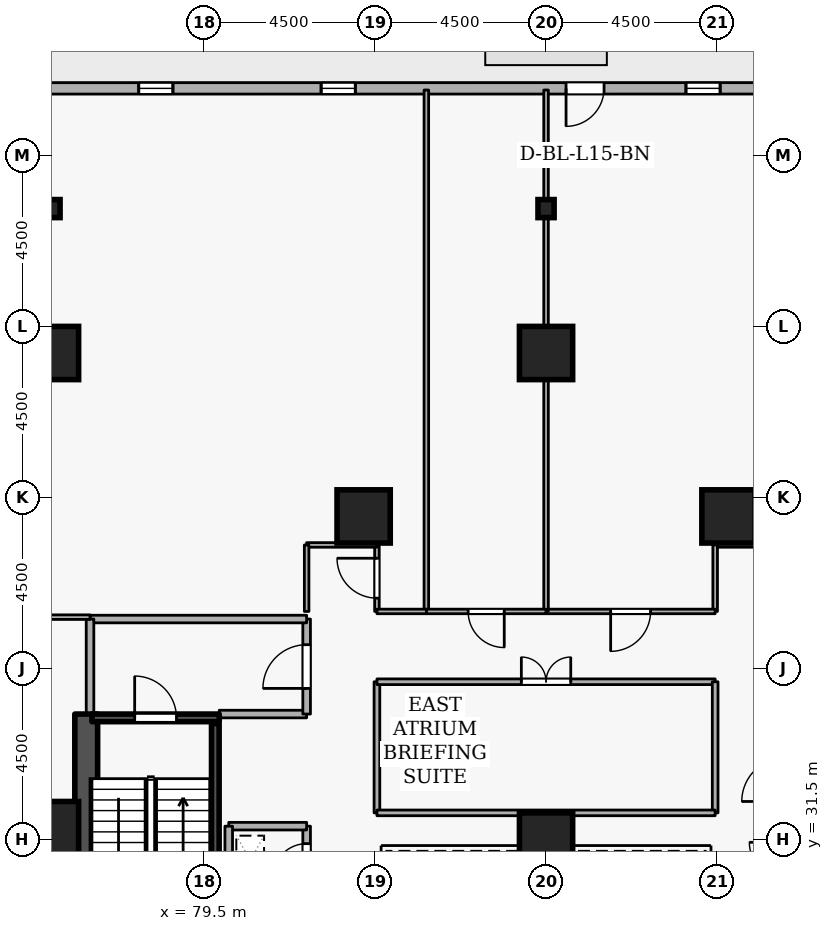
"""IFC4 building model, lengths in metres.
Left out: names, types, materials, properties, quantities, classifications, styles, units other than length and angle.
Written with IfcOpenShell. Run it as: python <this file> out.ifc"""

import sys

from ifc_helpers import new_model, si_unit, direction, frame, frame_2d, origin, origin_2d, place, context, subcontext, project, spatial, rectangle, i_section, extrude, element, fill, save


model = new_model("IFC4")
c1 = context("Model", 3, precision=1e-05, world=origin(), true_north=direction((0.0, 1.0)))
c2 = subcontext(c1, "Body", "Model", "MODEL_VIEW")
j1 = project(units=[si_unit("LENGTHUNIT", "METRE"), si_unit("PLANEANGLEUNIT", "RADIAN")], contexts=[c1])
p1 = place(None, origin())
s1 = spatial("IfcSite", under=j1, at=p1, CompositionType="ELEMENT")
p2 = place(p1, origin())
s2 = spatial("IfcBuilding", under=s1, at=p2, CompositionType="ELEMENT")
p3 = place(p2, frame((0.0, 0.0, 60.9)))
s3 = spatial("IfcBuildingStorey", under=s2, at=p3, CompositionType="ELEMENT", Elevation=60.9)
p4 = place(p3, frame((76.4, 19.2, 0.0), z_axis=(0.0, 0.0, 1.0), x_axis=(0.0, 1.0, 0.0)))
e1 = element("IfcWall", 1, at=p4, inside=s3, PredefinedType="SHEAR", context=c2, shape_type="SweptSolid", body=[
    extrude(rectangle(XDim=15.6, YDim=0.6, at=frame_2d((7.8, 0.0))), origin(), (0.0, 0.0, 1.0), 3.6),
])
for number, where, z_axis, x_axis in (
    (2, (88.5, 44.3, 0.0), (0.0, 0.0, 1.0), (1.0, 0.0, 0.0)),
    (3, (75.5, 44.3, 0.0), (0.0, 0.0, 1.0), (1.0, 0.0, 0.0)),
    (4, (93.3, 40.0, 0.0), (0.0, 0.0, 1.0), (1.0, 0.0, 0.0)),
    (5, (83.7, 40.0, 0.0), (0.0, 0.0, 1.0), (1.0, 0.0, 0.0)),
    (6, (75.5, 31.8, 0.0), (0.0, 0.0, 1.0), (1.0, 0.0, 0.0)),
    (7, (88.5, 31.5, 0.0), (0.0, 0.0, 1.0), (1.0, 0.0, 0.0)),
):
    element("IfcColumn", number, at=place(p3, frame(where, z_axis=z_axis, x_axis=x_axis)), inside=s3, PredefinedType="COLUMN", context=c2, shape_type="SweptSolid", body=[
        extrude(rectangle(XDim=1.4, YDim=1.4, at=origin_2d()), origin(), (0.0, 0.0, 1.0), 3.6),
    ])
for number, where, z_axis, x_axis in (
    (8, (88.5, 48.1, 0.0), (0.0, 0.0, 1.0), (1.0, 0.0, 0.0)),
    (9, (75.5, 48.1, 0.0), (0.0, 0.0, 1.0), (1.0, 0.0, 0.0)),
):
    element("IfcColumn", number, at=place(p3, frame(where, z_axis=z_axis, x_axis=x_axis)), inside=s3, PredefinedType="COLUMN", context=c2, shape_type="SweptSolid", body=[
        extrude(i_section(OverallWidth=0.424, OverallDepth=0.475, WebThickness=0.048, FlangeThickness=0.077, FilletRadius=0.015, at=origin_2d()), origin(), (0.0, 0.0, 1.0), 3.6),
    ])
p5 = place(p3, frame((110.181, 51.265, 0.0), z_axis=(0.0, 0.0, 1.0), x_axis=(-0.999999998209, -5.985515e-05, 0.0)))
e10 = element("IfcWall", 10, at=p5, inside=s3, PredefinedType="STANDARD", context=c2, shape_type="SweptSolid", body=[
    extrude(rectangle(XDim=36.71, YDim=0.3, at=frame_2d((18.355, 0.0))), origin(), (0.0, 0.0, 1.0), 2.7),
])
p6 = place(p5, frame((20.155, 0.0, 0.0)))
e11 = element("IfcOpeningElement", 11, at=p6, cuts=e10, PredefinedType="OPENING", context=c2, shape_type="SweptSolid", body=[
    extrude(rectangle(XDim=1.0, YDim=2.08, at=frame_2d((0.5, 1.04))), frame((0.0, 0.16, 0.0), z_axis=(0.0, -1.0, 0.0), x_axis=(1.0, 0.0, 0.0)), (0.0, 0.0, 1.0), 0.32),
])
p7 = place(p5, frame((2.7, 0.0, 0.72)))
e12 = element("IfcOpeningElement", 12, at=p7, cuts=e10, PredefinedType="OPENING", context=c2, shape_type="SweptSolid", body=[
    extrude(rectangle(XDim=0.9, YDim=1.75, at=frame_2d((0.45, 0.875))), frame((0.0, 0.16, 0.0), z_axis=(0.0, -1.0, 0.0), x_axis=(1.0, 0.0, 0.0)), (0.0, 0.0, 1.0), 0.32),
])
p8 = place(p5, frame((12.3, 0.0, 0.72)))
e13 = element("IfcOpeningElement", 13, at=p8, cuts=e10, PredefinedType="OPENING", context=c2, shape_type="SweptSolid", body=[
    extrude(rectangle(XDim=0.9, YDim=1.75, at=frame_2d((0.45, 0.875))), frame((0.0, 0.16, 0.0), z_axis=(0.0, -1.0, 0.0), x_axis=(1.0, 0.0, 0.0)), (0.0, 0.0, 1.0), 0.32),
])
p9 = place(p5, frame((17.1, 0.0, 0.72)))
e14 = element("IfcOpeningElement", 14, at=p9, cuts=e10, PredefinedType="OPENING", context=c2, shape_type="SweptSolid", body=[
    extrude(rectangle(XDim=0.9, YDim=1.75, at=frame_2d((0.45, 0.875))), frame((0.0, 0.16, 0.0), z_axis=(0.0, -1.0, 0.0), x_axis=(1.0, 0.0, 0.0)), (0.0, 0.0, 1.0), 0.32),
])
p10 = place(p5, frame((26.7, 0.0, 0.72)))
e15 = element("IfcOpeningElement", 15, at=p10, cuts=e10, PredefinedType="OPENING", context=c2, shape_type="SweptSolid", body=[
    extrude(rectangle(XDim=0.9, YDim=1.75, at=frame_2d((0.45, 0.875))), frame((0.0, 0.16, 0.0), z_axis=(0.0, -1.0, 0.0), x_axis=(1.0, 0.0, 0.0)), (0.0, 0.0, 1.0), 0.32),
])
p11 = place(p5, frame((31.5, 0.0, 0.72)))
e16 = element("IfcOpeningElement", 16, at=p11, cuts=e10, PredefinedType="OPENING", context=c2, shape_type="SweptSolid", body=[
    extrude(rectangle(XDim=0.9, YDim=1.75, at=frame_2d((0.45, 0.875))), frame((0.0, 0.16, 0.0), z_axis=(0.0, -1.0, 0.0), x_axis=(1.0, 0.0, 0.0)), (0.0, 0.0, 1.0), 0.32),
])
p12 = place(p3, frame((76.55, 34.7, 0.0), z_axis=(0.0, 0.0, 1.0), x_axis=(1.0, 0.0, 0.0)))
e17 = element("IfcWall", 17, at=p12, inside=s3, PredefinedType="SHEAR", context=c2, shape_type="SweptSolid", body=[
    extrude(rectangle(XDim=3.35, YDim=0.2, at=frame_2d((1.675, 0.0))), origin(), (0.0, 0.0, 1.0), 3.6),
])
p13 = place(p12, frame((1.125, 0.0, 0.0)))
e18 = element("IfcOpeningElement", 18, at=p13, cuts=e17, PredefinedType="OPENING", context=c2, shape_type="SweptSolid", body=[
    extrude(rectangle(XDim=1.1, YDim=2.1, at=frame_2d((0.55, 1.05))), frame((0.0, 0.11, 0.0), z_axis=(0.0, -1.0, 0.0), x_axis=(1.0, 0.0, 0.0)), (0.0, 0.0, 1.0), 0.22),
])
p14 = place(p3, frame((79.797, 27.45, 0.0), z_axis=(0.0, 0.0, 1.0), x_axis=(0.0, 1.0, 0.0)))
e19 = element("IfcWall", 19, at=p14, inside=s3, PredefinedType="SHEAR", context=c2, shape_type="SweptSolid", body=[
    extrude(rectangle(XDim=7.1, YDim=0.2, at=frame_2d((3.55, 0.0))), origin(), (0.0, 0.0, 1.0), 3.6),
])
p15 = place(p3, frame((79.9, 34.8, 0.0), z_axis=(0.0, 0.0, 1.0), x_axis=(1.0, 0.0, 0.0)))
e20 = element("IfcWall", 20, at=p15, inside=s3, PredefinedType="STANDARD", context=c2, shape_type="SweptSolid", body=[
    extrude(rectangle(XDim=2.3, YDim=0.2, at=frame_2d((1.15, 0.0))), origin(), (0.0, 0.0, 1.0), 2.545),
])
p16 = place(p3, frame((82.2, 34.8, 0.0), z_axis=(0.0, 0.0, 1.0), x_axis=(0.0, 1.0, 0.0)))
e21 = element("IfcWall", 21, at=p16, inside=s3, PredefinedType="STANDARD", context=c2, shape_type="SweptSolid", body=[
    extrude(rectangle(XDim=2.5, YDim=0.2, at=frame_2d((1.25, 0.0))), origin(), (0.0, 0.0, 1.0), 3.34),
])
p17 = place(p16, frame((0.675, 0.0, 0.0)))
e22 = element("IfcOpeningElement", 22, at=p17, cuts=e21, PredefinedType="OPENING", context=c2, shape_type="SweptSolid", body=[
    extrude(rectangle(XDim=1.15, YDim=2.1, at=frame_2d((0.575, 1.05))), frame((0.0, 0.11, 0.0), z_axis=(0.0, -1.0, 0.0), x_axis=(1.0, 0.0, 0.0)), (0.0, 0.0, 1.0), 0.22),
])
p18 = place(p3, frame((82.2, 37.3, 0.0), z_axis=(0.0, 0.0, 1.0), x_axis=(-1.0, 0.0, 0.0)))
e23 = element("IfcWall", 23, at=p18, inside=s3, PredefinedType="STANDARD", context=c2, shape_type="SweptSolid", body=[
    extrude(rectangle(XDim=5.7, YDim=0.2, at=frame_2d((2.85, 0.0))), origin(), (0.0, 0.0, 1.0), 3.34),
])
p19 = place(p3, frame((76.5, 37.3, 0.0), z_axis=(0.0, 0.0, 1.0), x_axis=(0.0, -1.0, 0.0)))
e24 = element("IfcWall", 24, at=p19, inside=s3, PredefinedType="STANDARD", context=c2, shape_type="SweptSolid", body=[
    extrude(rectangle(XDim=2.5, YDim=0.2, at=frame_2d((1.25, 0.0))), origin(), (0.0, 0.0, 1.0), 3.34),
])
p20 = place(p3, frame((82.2, 30.05, 0.0), z_axis=(0.0, 0.0, 1.0), x_axis=(0.0, 1.0, 0.0)))
e25 = element("IfcWall", 25, at=p20, inside=s3, PredefinedType="STANDARD", context=c2, shape_type="SweptSolid", body=[
    extrude(rectangle(XDim=1.8, YDim=0.2, at=frame_2d((0.9, 0.0))), origin(), (0.0, 0.0, 1.0), 3.34),
])
p21 = place(p20, frame((0.46, 0.0, 0.0)))
e26 = element("IfcOpeningElement", 26, at=p21, cuts=e25, PredefinedType="OPENING", context=c2, shape_type="SweptSolid", body=[
    extrude(rectangle(XDim=0.88, YDim=2.04, at=frame_2d((0.44, 1.02))), frame((0.0, 0.11, 0.0), z_axis=(0.0, -1.0, 0.0), x_axis=(1.0, 0.0, 0.0)), (0.0, 0.0, 1.0), 0.22),
])
p22 = place(p3, frame((82.2, 31.85, 0.0), z_axis=(0.0, 0.0, 1.0), x_axis=(-1.0, 0.0, 0.0)))
e27 = element("IfcWall", 27, at=p22, inside=s3, PredefinedType="STANDARD", context=c2, shape_type="SweptSolid", body=[
    extrude(rectangle(XDim=2.05, YDim=0.2, at=frame_2d((1.025, 0.0))), origin(), (0.0, 0.0, 1.0), 3.34),
])
p23 = place(p3, frame((80.15, 31.85, 0.0), z_axis=(0.0, 0.0, 1.0), x_axis=(0.0, -1.0, 0.0)))
e28 = element("IfcWall", 28, at=p23, inside=s3, PredefinedType="STANDARD", context=c2, shape_type="SweptSolid", body=[
    extrude(rectangle(XDim=1.8, YDim=0.2, at=frame_2d((0.9, 0.0))), origin(), (0.0, 0.0, 1.0), 3.34),
])
p24 = place(p3, frame((94.8, 39.25, 0.0), z_axis=(0.0, 0.0, 1.0), x_axis=(-1.0, 0.0, 0.0)))
e29 = element("IfcWall", 29, at=p24, inside=s3, PredefinedType="PARTITIONING", context=c2, shape_type="SweptSolid", body=[
    extrude(rectangle(XDim=1.85, YDim=0.12, at=frame_2d((0.925, 0.0))), origin(), (0.0, 0.0, 1.0), 3.34),
])
p25 = place(p3, frame((92.95, 39.25, 0.0), z_axis=(0.0, 0.0, 1.0), x_axis=(0.0, -1.0, 0.0)))
e30 = element("IfcWall", 30, at=p25, inside=s3, PredefinedType="PARTITIONING", context=c2, shape_type="SweptSolid", body=[
    extrude(rectangle(XDim=1.75, YDim=0.12, at=frame_2d((0.875, 0.0))), origin(), (0.0, 0.0, 1.0), 3.34),
])
p26 = place(p3, frame((92.95, 37.5, 0.0), z_axis=(0.0, 0.0, 1.0), x_axis=(-1.0, 0.0, 0.0)))
e31 = element("IfcWall", 31, at=p26, inside=s3, PredefinedType="PARTITIONING", context=c2, shape_type="SweptSolid", body=[
    extrude(rectangle(XDim=4.45, YDim=0.12, at=frame_2d((2.225, 0.0))), origin(), (0.0, 0.0, 1.0), 3.34),
])
p27 = place(p26, frame((1.7, 0.0, 0.0)))
e32 = element("IfcOpeningElement", 32, at=p27, cuts=e31, PredefinedType="OPENING", context=c2, shape_type="SweptSolid", body=[
    extrude(rectangle(XDim=1.05, YDim=2.1, at=frame_2d((0.525, 1.05))), frame((0.0, 0.07, 0.0), z_axis=(0.0, -1.0, 0.0), x_axis=(1.0, 0.0, 0.0)), (0.0, 0.0, 1.0), 0.14),
])
p28 = place(p3, frame((88.5, 37.5, 0.0), z_axis=(0.0, 0.0, 1.0), x_axis=(0.0, 1.0, 0.0)))
e33 = element("IfcWall", 33, at=p28, inside=s3, PredefinedType="PARTITIONING", context=c2, shape_type="SweptSolid", body=[
    extrude(rectangle(XDim=13.72, YDim=0.12, at=frame_2d((6.86, 0.0))), origin(), (0.0, 0.0, 1.0), 2.878),
])
p29 = place(p3, frame((85.35, 37.5, 0.0), z_axis=(0.0, 0.0, 1.0), x_axis=(0.0, 1.0, 0.0)))
e34 = element("IfcWall", 34, at=p29, inside=s3, PredefinedType="PARTITIONING", context=c2, shape_type="SweptSolid", body=[
    extrude(rectangle(XDim=13.72, YDim=0.12, at=frame_2d((6.86, 0.0))), origin(), (0.0, 0.0, 1.0), 3.34),
])
p30 = place(p3, frame((88.5, 37.5, 0.0), z_axis=(0.0, 0.0, 1.0), x_axis=(-1.0, 0.0, 0.0)))
e35 = element("IfcWall", 35, at=p30, inside=s3, PredefinedType="PARTITIONING", context=c2, shape_type="SweptSolid", body=[
    extrude(rectangle(XDim=3.15, YDim=0.12, at=frame_2d((1.575, 0.0))), origin(), (0.0, 0.0, 1.0), 3.34),
])
p31 = place(p30, frame((1.1, 0.0, 0.0)))
e36 = element("IfcOpeningElement", 36, at=p31, cuts=e35, PredefinedType="OPENING", context=c2, shape_type="SweptSolid", body=[
    extrude(rectangle(XDim=0.95, YDim=2.1, at=frame_2d((0.475, 1.05))), frame((0.0, 0.07, 0.0), z_axis=(0.0, -1.0, 0.0), x_axis=(1.0, 0.0, 0.0)), (0.0, 0.0, 1.0), 0.14),
])
p32 = place(p3, frame((84.05, 37.5, 0.0), z_axis=(0.0, 0.0, 1.0), x_axis=(0.0, 1.0, 0.0)))
e37 = element("IfcWall", 37, at=p32, inside=s3, PredefinedType="PARTITIONING", context=c2, shape_type="SweptSolid", body=[
    extrude(rectangle(XDim=1.75, YDim=0.12, at=frame_2d((0.875, 0.0))), origin(), (0.0, 0.0, 1.0), 3.34),
])
p33 = place(p32, frame((0.35, 0.0, 0.0)))
e38 = element("IfcOpeningElement", 38, at=p33, cuts=e37, PredefinedType="OPENING", context=c2, shape_type="SweptSolid", body=[
    extrude(rectangle(XDim=1.05, YDim=2.1, at=frame_2d((0.525, 1.05))), frame((0.0, 0.07, 0.0), z_axis=(0.0, -1.0, 0.0), x_axis=(1.0, 0.0, 0.0)), (0.0, 0.0, 1.0), 0.14),
])
p34 = place(p3, frame((84.05, 39.25, 0.0), z_axis=(0.0, 0.0, 1.0), x_axis=(-1.0, 0.0, 0.0)))
e39 = element("IfcWall", 39, at=p34, inside=s3, PredefinedType="PARTITIONING", context=c2, shape_type="SweptSolid", body=[
    extrude(rectangle(XDim=1.85, YDim=0.12, at=frame_2d((0.925, 0.0))), origin(), (0.0, 0.0, 1.0), 3.34),
])
p35 = place(p3, frame((82.2, 39.25, 0.0), z_axis=(0.0, 0.0, 1.0), x_axis=(0.0, -1.0, 0.0)))
e40 = element("IfcWall", 40, at=p35, inside=s3, PredefinedType="PARTITIONING", context=c2, shape_type="SweptSolid", body=[
    extrude(rectangle(XDim=1.75, YDim=0.12, at=frame_2d((0.875, 0.0))), origin(), (0.0, 0.0, 1.0), 3.34),
])
p36 = place(p3, frame((76.5, 37.35, 0.0), z_axis=(0.0, 0.0, 1.0), x_axis=(-1.0, 0.0, 0.0)))
e41 = element("IfcWall", 41, at=p36, inside=s3, PredefinedType="PARTITIONING", context=c2, shape_type="SweptSolid", body=[
    extrude(rectangle(XDim=6.22, YDim=0.12, at=frame_2d((3.11, 0.0))), origin(), (0.0, 0.0, 1.0), 3.34),
])
p37 = place(p3, frame((85.35, 37.5, 0.0), z_axis=(0.0, 0.0, 1.0), x_axis=(-1.0, 0.0, 0.0)))
e42 = element("IfcWall", 42, at=p37, inside=s3, PredefinedType="PARTITIONING", context=c2, shape_type="SweptSolid", body=[
    extrude(rectangle(XDim=1.3, YDim=0.12, at=frame_2d((0.65, 0.0))), origin(), (0.0, 0.0, 1.0), 3.34),
])
p38 = place(p3, frame((84.05, 32.2, 0.0), z_axis=(0.0, 0.0, 1.0), x_axis=(0.0, 1.0, 0.0)))
e43 = element("IfcWall", 43, at=p38, inside=s3, PredefinedType="PARTITIONING", context=c2, shape_type="SweptSolid", body=[
    extrude(rectangle(XDim=3.45, YDim=0.15, at=frame_2d((1.725, 0.0))), origin(), (0.0, 0.0, 1.0), 3.34),
])
p39 = place(p3, frame((84.05, 35.65, 0.0), z_axis=(0.0, 0.0, 1.0), x_axis=(1.0, 0.0, 0.0)))
e44 = element("IfcWall", 44, at=p39, inside=s3, PredefinedType="PARTITIONING", context=c2, shape_type="SweptSolid", body=[
    extrude(rectangle(XDim=8.9, YDim=0.15, at=frame_2d((4.45, 0.0))), origin(), (0.0, 0.0, 1.0), 3.34),
])
p40 = place(p39, frame((3.8, 0.0, 0.0)))
e45 = element("IfcOpeningElement", 45, at=p40, cuts=e44, PredefinedType="OPENING", context=c2, shape_type="SweptSolid", body=[
    extrude(rectangle(XDim=1.3, YDim=2.12, at=frame_2d((0.65, 1.06))), frame((0.0, 0.085, 0.0), z_axis=(0.0, -1.0, 0.0), x_axis=(1.0, 0.0, 0.0)), (0.0, 0.0, 1.0), 0.17),
])
p41 = place(p3, frame((92.95, 35.65, 0.0), z_axis=(0.0, 0.0, 1.0), x_axis=(0.0, -1.0, 0.0)))
e46 = element("IfcWall", 46, at=p41, inside=s3, PredefinedType="PARTITIONING", context=c2, shape_type="SweptSolid", body=[
    extrude(rectangle(XDim=3.45, YDim=0.15, at=frame_2d((1.725, 0.0))), origin(), (0.0, 0.0, 1.0), 3.34),
])
p42 = place(p3, frame((92.95, 32.2, 0.0), z_axis=(0.0, 0.0, 1.0), x_axis=(-1.0, 0.0, 0.0)))
e47 = element("IfcWall", 47, at=p42, inside=s3, PredefinedType="PARTITIONING", context=c2, shape_type="SweptSolid", body=[
    extrude(rectangle(XDim=8.9, YDim=0.15, at=frame_2d((4.45, 0.0))), origin(), (0.0, 0.0, 1.0), 3.34),
])
p43 = place(p6, origin())
e48 = element("IfcDoor", 48, at=p43, inside=s3, OperationType="SINGLE_SWING_RIGHT", PredefinedType="DOOR", context=c2, shape_type="SweptSolid", body=[
    extrude(rectangle(XDim=1.0, YDim=2.08, at=frame_2d((0.5, 1.04))), frame((0.0, 0.025, 0.0), z_axis=(0.0, -1.0, 0.0), x_axis=(1.0, 0.0, 0.0)), (0.0, 0.0, 1.0), 0.05),
])
fill(e11, e48)
p44 = place(p9, origin())
e49 = element("IfcWindow", 49, at=p44, inside=s3, PartitioningType="SINGLE_PANEL", PredefinedType="WINDOW", context=c2, shape_type="SweptSolid", body=[
    extrude(rectangle(XDim=0.9, YDim=1.75, at=frame_2d((0.45, 0.875))), frame((0.0, 0.03, 0.0), z_axis=(0.0, -1.0, 0.0), x_axis=(1.0, 0.0, 0.0)), (0.0, 0.0, 1.0), 0.06),
])
fill(e14, e49)
p45 = place(p10, origin())
e50 = element("IfcWindow", 50, at=p45, inside=s3, PartitioningType="SINGLE_PANEL", PredefinedType="WINDOW", context=c2, shape_type="SweptSolid", body=[
    extrude(rectangle(XDim=0.9, YDim=1.75, at=frame_2d((0.45, 0.875))), frame((0.0, 0.03, 0.0), z_axis=(0.0, -1.0, 0.0), x_axis=(1.0, 0.0, 0.0)), (0.0, 0.0, 1.0), 0.06),
])
fill(e15, e50)
p46 = place(p11, origin())
e51 = element("IfcWindow", 51, at=p46, inside=s3, PartitioningType="SINGLE_PANEL", PredefinedType="WINDOW", context=c2, shape_type="SweptSolid", body=[
    extrude(rectangle(XDim=0.9, YDim=1.75, at=frame_2d((0.45, 0.875))), frame((0.0, 0.03, 0.0), z_axis=(0.0, -1.0, 0.0), x_axis=(1.0, 0.0, 0.0)), (0.0, 0.0, 1.0), 0.06),
])
fill(e16, e51)
p47 = place(p13, origin())
e52 = element("IfcDoor", 52, at=p47, inside=s3, OperationType="SINGLE_SWING_LEFT", PredefinedType="DOOR", context=c2, shape_type="SweptSolid", body=[
    extrude(rectangle(XDim=1.1, YDim=2.1, at=frame_2d((0.55, 1.05))), frame((0.0, 0.025, 0.0), z_axis=(0.0, -1.0, 0.0), x_axis=(1.0, 0.0, 0.0)), (0.0, 0.0, 1.0), 0.05),
])
fill(e18, e52)
p48 = place(p17, origin())
e53 = element("IfcDoor", 53, at=p48, inside=s3, OperationType="SINGLE_SWING_LEFT", PredefinedType="DOOR", context=c2, shape_type="SweptSolid", body=[
    extrude(rectangle(XDim=1.15, YDim=2.1, at=frame_2d((0.575, 1.05))), frame((0.0, 0.025, 0.0), z_axis=(0.0, -1.0, 0.0), x_axis=(1.0, 0.0, 0.0)), (0.0, 0.0, 1.0), 0.05),
])
fill(e22, e53)
p49 = place(p21, origin())
e54 = element("IfcDoor", 54, at=p49, inside=s3, OperationType="SINGLE_SWING_LEFT", PredefinedType="DOOR", context=c2, shape_type="SweptSolid", body=[
    extrude(rectangle(XDim=0.88, YDim=2.04, at=frame_2d((0.44, 1.02))), frame((0.0, 0.025, 0.0), z_axis=(0.0, -1.0, 0.0), x_axis=(1.0, 0.0, 0.0)), (0.0, 0.0, 1.0), 0.05),
])
fill(e26, e54)
p50 = place(p27, origin())
e55 = element("IfcDoor", 55, at=p50, inside=s3, OperationType="SINGLE_SWING_RIGHT", PredefinedType="DOOR", context=c2, shape_type="SweptSolid", body=[
    extrude(rectangle(XDim=1.05, YDim=2.1, at=frame_2d((0.525, 1.05))), frame((0.0, 0.025, 0.0), z_axis=(0.0, -1.0, 0.0), x_axis=(1.0, 0.0, 0.0)), (0.0, 0.0, 1.0), 0.05),
])
fill(e32, e55)
p51 = place(p31, origin())
e56 = element("IfcDoor", 56, at=p51, inside=s3, OperationType="SINGLE_SWING_LEFT", PredefinedType="DOOR", context=c2, shape_type="SweptSolid", body=[
    extrude(rectangle(XDim=0.95, YDim=2.1, at=frame_2d((0.475, 1.05))), frame((0.0, 0.025, 0.0), z_axis=(0.0, -1.0, 0.0), x_axis=(1.0, 0.0, 0.0)), (0.0, 0.0, 1.0), 0.05),
])
fill(e36, e56)
p52 = place(p33, origin())
e57 = element("IfcDoor", 57, at=p52, inside=s3, OperationType="SINGLE_SWING_RIGHT", PredefinedType="DOOR", context=c2, shape_type="SweptSolid", body=[
    extrude(rectangle(XDim=1.05, YDim=2.1, at=frame_2d((0.525, 1.05))), frame((0.0, 0.025, 0.0), z_axis=(0.0, -1.0, 0.0), x_axis=(1.0, 0.0, 0.0)), (0.0, 0.0, 1.0), 0.05),
])
fill(e38, e57)
p53 = place(p40, origin())
e58 = element("IfcDoor", 58, at=p53, inside=s3, OperationType="DOUBLE_DOOR_SINGLE_SWING", PredefinedType="DOOR", context=c2, shape_type="SweptSolid", body=[
    extrude(rectangle(XDim=1.3, YDim=2.12, at=frame_2d((0.65, 1.06))), frame((0.0, 0.025, 0.0), z_axis=(0.0, -1.0, 0.0), x_axis=(1.0, 0.0, 0.0)), (0.0, 0.0, 1.0), 0.05),
])
fill(e45, e58)
save(model, sys.argv[1])
